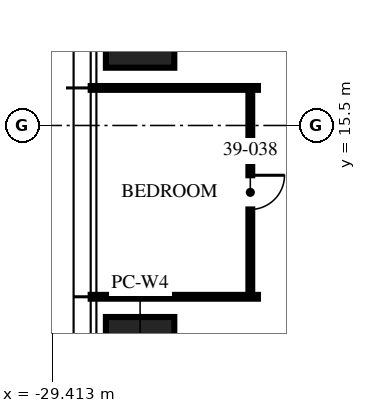
"""IFC4 building model, lengths in metres.
Left out: names, types, materials, properties, quantities, classifications, styles, units other than length and angle.
Written with IfcOpenShell. Run it as: python <this file> out.ifc"""

import sys

from ifc_helpers import new_model, si_unit, direction, frame, frame_2d, origin, origin_2d, place, context, subcontext, project, spatial, rectangle, extrude, element, fill, save


model = new_model("IFC4")
c1 = context("Model", 3, precision=1e-05, world=origin(), true_north=direction((0.0, 1.0)))
c2 = subcontext(c1, "Body", "Model", "MODEL_VIEW")
j1 = project(units=[si_unit("LENGTHUNIT", "METRE"), si_unit("PLANEANGLEUNIT", "RADIAN")], contexts=[c1])
p1 = place(None, origin())
s1 = spatial("IfcSite", under=j1, at=p1, CompositionType="ELEMENT")
p2 = place(p1, origin())
s2 = spatial("IfcBuilding", under=s1, at=p2, CompositionType="ELEMENT")
p3 = place(p2, frame((0.0, 0.0, 156.0)))
s3 = spatial("IfcBuildingStorey", under=s2, at=p3, CompositionType="ELEMENT", Elevation=156.0)
for number, where, z_axis, x_axis in (
    (1, (-27.1, 9.16, 0.0), (0.0, 0.0, 1.0), (0.0, 1.0, 0.0)),
    (2, (-27.1, 18.32, 0.0), (0.0, 0.0, 1.0), (0.0, 1.0, 0.0)),
):
    element("IfcColumn", number, at=place(p3, frame(where, z_axis=z_axis, x_axis=x_axis)), inside=s3, PredefinedType="COLUMN", context=c2, shape_type="SweptSolid", body=[
        extrude(rectangle(XDim=2.6, YDim=1.8, at=origin_2d()), origin(), (0.0, 0.0, 1.0), 3.75),
    ])
for number, where, z_axis, x_axis in (
    (3, (-24.0, 16.488, 0.0), (0.0, 0.0, 1.0), (-1.0, 0.0, 0.0)),
    (4, (-24.0, 10.992, 0.0), (0.0, 0.0, 1.0), (-1.0, 0.0, 0.0)),
):
    element("IfcWall", number, at=place(p3, frame(where, z_axis=z_axis, x_axis=x_axis)), inside=s3, PredefinedType="PARTITIONING", context=c2, shape_type="SweptSolid", body=[
        extrude(rectangle(XDim=4.4, YDim=0.1, at=frame_2d((2.2, 0.0))), origin(), (0.0, 0.0, 1.0), 2.81),
    ])
p4 = place(p3, frame((-24.2, 16.488, 0.0), z_axis=(0.0, 0.0, 1.0), x_axis=(0.0, -1.0, 0.0)))
e5 = element("IfcWall", 5, at=p4, inside=s3, PredefinedType="PARTITIONING", context=c2, shape_type="SweptSolid", body=[
    extrude(rectangle(XDim=5.496, YDim=0.1, at=frame_2d((2.748, 0.0))), origin(), (0.0, 0.0, 1.0), 2.81),
])
p5 = place(p4, frame((2.298, 0.0, 0.0)))
e6 = element("IfcOpeningElement", 6, at=p5, cuts=e5, PredefinedType="OPENING", context=c2, shape_type="SweptSolid", body=[
    extrude(rectangle(XDim=0.9, YDim=2.1, at=frame_2d((0.45, 1.05))), frame((0.0, 0.06, 0.0), z_axis=(0.0, -1.0, 0.0), x_axis=(1.0, 0.0, 0.0)), (0.0, 0.0, 1.0), 0.12),
])
p6 = place(p5, origin())
e7 = element("IfcDoor", 7, at=p6, inside=s3, OperationType="SINGLE_SWING_LEFT", PredefinedType="DOOR", context=c2, shape_type="SweptSolid", body=[
    extrude(rectangle(XDim=0.9, YDim=2.1, at=frame_2d((0.45, 1.05))), frame((0.0, 0.025, 0.0), z_axis=(0.0, -1.0, 0.0), x_axis=(1.0, 0.0, 0.0)), (0.0, 0.0, 1.0), 0.05),
])
fill(e6, e7)
save(model, sys.argv[1])
